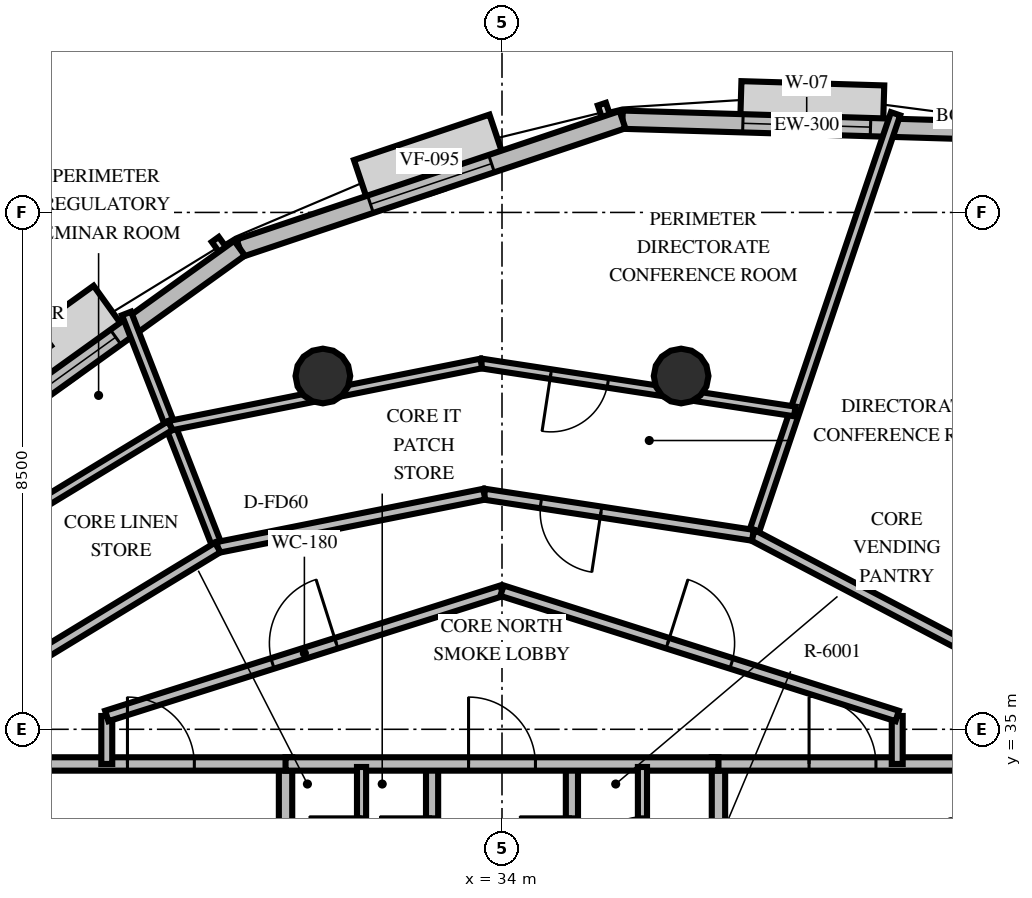
"""IFC4 building model, lengths in metres.
Left out: names, types, materials, properties, quantities, classifications, styles, units other than length and angle.
Written with IfcOpenShell. Run it as: python <this file> out.ifc"""

import sys

from ifc_helpers import new_model, si_unit, direction, frame, frame_2d, origin, origin_2d, place, context, subcontext, project, spatial, rectangle, circle, extrude, element, fill, save


model = new_model("IFC4")
c1 = context("Model", 3, precision=1e-05, world=origin(), true_north=direction((0.0, 1.0)))
c2 = subcontext(c1, "Body", "Model", "MODEL_VIEW")
j1 = project(units=[si_unit("LENGTHUNIT", "METRE"), si_unit("PLANEANGLEUNIT", "RADIAN")], contexts=[c1])
p1 = place(None, origin())
s1 = spatial("IfcSite", under=j1, at=p1, CompositionType="ELEMENT")
p2 = place(p1, origin())
s2 = spatial("IfcBuilding", under=s1, at=p2, CompositionType="ELEMENT")
p3 = place(p2, frame((0.0, 0.0, 244.8)))
s3 = spatial("IfcBuildingStorey", under=s2, at=p3, CompositionType="ELEMENT", Elevation=244.8)
for number, where, z_axis, x_axis in (
    (1, (36.946, 40.81, 0.0), (0.0, 0.0, 1.0), (1.0, 0.0, 0.0)),
    (2, (31.054, 40.81, 0.0), (0.0, 0.0, 1.0), (1.0, 0.0, 0.0)),
):
    element("IfcColumn", number, at=place(p3, frame(where, z_axis=z_axis, x_axis=x_axis)), inside=s3, PredefinedType="COLUMN", context=c2, shape_type="SweptSolid", body=[
        extrude(circle(Radius=0.45, at=origin_2d()), origin(), (0.0, 0.0, 1.0), 3.6),
    ])
p4 = place(p3, frame((42.041, 44.844, 0.0), z_axis=(0.0, 0.0, 1.0), x_axis=(-0.999549748053, 0.030005019031, 0.0)))
e3 = element("IfcWall", 3, at=p4, inside=s3, PredefinedType="SOLIDWALL", context=c2, shape_type="SweptSolid", body=[
    extrude(rectangle(XDim=6.062, YDim=0.3, at=frame_2d((3.031, 0.0))), origin(), (0.0, 0.0, 1.0), 2.76),
])
p5 = place(p4, frame((1.981, 0.0, 0.8)))
e4 = element("IfcOpeningElement", 4, at=p5, cuts=e3, PredefinedType="OPENING", context=c2, shape_type="SweptSolid", body=[
    extrude(rectangle(XDim=2.1, YDim=1.85, at=frame_2d((1.05, 0.925))), frame((0.0, 0.16, 0.0), z_axis=(0.0, -1.0, 0.0), x_axis=(1.0, 0.0, 0.0)), (0.0, 0.0, 1.0), 0.32),
])
p6 = place(p3, frame((35.982, 45.025, 0.0), z_axis=(0.0, 0.0, 1.0), x_axis=(-0.948064074007, -0.318079410805, 0.0)))
e5 = element("IfcWall", 5, at=p6, inside=s3, PredefinedType="SOLIDWALL", context=c2, shape_type="SweptSolid", body=[
    extrude(rectangle(XDim=6.643, YDim=0.3, at=frame_2d((3.322, 0.0))), origin(), (0.0, 0.0, 1.0), 2.76),
])
p7 = place(p6, frame((2.272, 0.0, 0.8)))
e6 = element("IfcOpeningElement", 6, at=p7, cuts=e5, PredefinedType="OPENING", context=c2, shape_type="SweptSolid", body=[
    extrude(rectangle(XDim=2.1, YDim=1.85, at=frame_2d((1.05, 0.925))), frame((0.0, 0.16, 0.0), z_axis=(0.0, -1.0, 0.0), x_axis=(1.0, 0.0, 0.0)), (0.0, 0.0, 1.0), 0.32),
])
p8 = place(p3, frame((29.684, 42.912, 0.0), z_axis=(0.0, 0.0, 1.0), x_axis=(-0.81200266695, -0.583653723424, 0.0)))
e7 = element("IfcWall", 7, at=p8, inside=s3, PredefinedType="SOLIDWALL", context=c2, shape_type="SweptSolid", body=[
    extrude(rectangle(XDim=7.115, YDim=0.3, at=frame_2d((3.558, 0.0))), origin(), (0.0, 0.0, 1.0), 2.76),
])
p9 = place(p8, frame((2.508, 0.0, 0.8)))
e8 = element("IfcOpeningElement", 8, at=p9, cuts=e7, PredefinedType="OPENING", context=c2, shape_type="SweptSolid", body=[
    extrude(rectangle(XDim=2.1, YDim=1.85, at=frame_2d((1.05, 0.925))), frame((0.0, 0.16, 0.0), z_axis=(0.0, -1.0, 0.0), x_axis=(1.0, 0.0, 0.0)), (0.0, 0.0, 1.0), 0.32),
])
p10 = place(p3, frame((30.44, 30.05, 0.0), z_axis=(0.0, 0.0, 1.0), x_axis=(0.0, 1.0, 0.0)))
e9 = element("IfcWall", 9, at=p10, inside=s3, PredefinedType="SOLIDWALL", context=c2, shape_type="SweptSolid", body=[
    extrude(rectangle(XDim=4.38, YDim=0.22, at=frame_2d((2.19, 0.0))), origin(), (0.0, 0.0, 1.0), 2.46),
])
p11 = place(p10, frame((0.8, 0.0, 0.0)))
e10 = element("IfcOpeningElement", 10, at=p11, cuts=e9, PredefinedType="OPENING", context=c2, shape_type="SweptSolid", body=[
    extrude(rectangle(XDim=1.05, YDim=2.1, at=frame_2d((0.525, 1.05))), frame((0.0, 0.12, 0.0), z_axis=(0.0, -1.0, 0.0), x_axis=(1.0, 0.0, 0.0)), (0.0, 0.0, 1.0), 0.24),
])
p12 = place(p3, frame((26.24, 34.43, 0.0), z_axis=(0.0, 0.0, 1.0), x_axis=(1.0, 0.0, 0.0)))
e11 = element("IfcWall", 11, at=p12, inside=s3, PredefinedType="SOLIDWALL", context=c2, shape_type="SweptSolid", body=[
    extrude(rectangle(XDim=4.31, YDim=0.22, at=frame_2d((2.155, 0.0))), origin(), (0.0, 0.0, 1.0), 2.46),
])
p13 = place(p12, frame((1.6, 0.0, 0.0)))
e12 = element("IfcOpeningElement", 12, at=p13, cuts=e11, PredefinedType="OPENING", context=c2, shape_type="SweptSolid", body=[
    extrude(rectangle(XDim=1.1, YDim=2.15, at=frame_2d((0.55, 1.075))), frame((0.0, 0.12, 0.0), z_axis=(0.0, -1.0, 0.0), x_axis=(1.0, 0.0, 0.0)), (0.0, 0.0, 1.0), 0.24),
])
p14 = place(p3, frame((32.85, 30.05, 0.0), z_axis=(0.0, 0.0, 1.0), x_axis=(0.0, 1.0, 0.0)))
e13 = element("IfcWall", 13, at=p14, inside=s3, PredefinedType="SOLIDWALL", context=c2, shape_type="SweptSolid", body=[
    extrude(rectangle(XDim=4.38, YDim=0.2, at=frame_2d((2.19, 0.0))), origin(), (0.0, 0.0, 1.0), 2.46),
])
p15 = place(p14, frame((2.65, 0.0, 0.0)))
e14 = element("IfcOpeningElement", 14, at=p15, cuts=e13, PredefinedType="OPENING", context=c2, shape_type="SweptSolid", body=[
    extrude(rectangle(XDim=0.86, YDim=2.05, at=frame_2d((0.43, 1.025))), frame((0.0, 0.11, 0.0), z_axis=(0.0, -1.0, 0.0), x_axis=(1.0, 0.0, 0.0)), (0.0, 0.0, 1.0), 0.22),
])
p16 = place(p3, frame((37.56, 30.05, 0.0), z_axis=(0.0, 0.0, 1.0), x_axis=(0.0, 1.0, 0.0)))
e15 = element("IfcWall", 15, at=p16, inside=s3, PredefinedType="SOLIDWALL", context=c2, shape_type="SweptSolid", body=[
    extrude(rectangle(XDim=4.38, YDim=0.22, at=frame_2d((2.19, 0.0))), origin(), (0.0, 0.0, 1.0), 2.46),
])
p17 = place(p16, frame((0.8, 0.0, 0.0)))
e16 = element("IfcOpeningElement", 16, at=p17, cuts=e15, PredefinedType="OPENING", context=c2, shape_type="SweptSolid", body=[
    extrude(rectangle(XDim=1.05, YDim=2.1, at=frame_2d((0.525, 1.05))), frame((0.0, 0.12, 0.0), z_axis=(0.0, -1.0, 0.0), x_axis=(1.0, 0.0, 0.0)), (0.0, 0.0, 1.0), 0.24),
])
p18 = place(p3, frame((37.45, 34.43, 0.0), z_axis=(0.0, 0.0, 1.0), x_axis=(1.0, 0.0, 0.0)))
e17 = element("IfcWall", 17, at=p18, inside=s3, PredefinedType="SOLIDWALL", context=c2, shape_type="SweptSolid", body=[
    extrude(rectangle(XDim=4.31, YDim=0.22, at=frame_2d((2.155, 0.0))), origin(), (0.0, 0.0, 1.0), 2.46),
])
p19 = place(p18, frame((1.6, 0.0, 0.0)))
e18 = element("IfcOpeningElement", 18, at=p19, cuts=e17, PredefinedType="OPENING", context=c2, shape_type="SweptSolid", body=[
    extrude(rectangle(XDim=1.1, YDim=2.15, at=frame_2d((0.55, 1.075))), frame((0.0, 0.12, 0.0), z_axis=(0.0, -1.0, 0.0), x_axis=(1.0, 0.0, 0.0)), (0.0, 0.0, 1.0), 0.24),
])
p20 = place(p3, frame((35.15, 30.05, 0.0), z_axis=(0.0, 0.0, 1.0), x_axis=(0.0, 1.0, 0.0)))
e19 = element("IfcWall", 19, at=p20, inside=s3, PredefinedType="SOLIDWALL", context=c2, shape_type="SweptSolid", body=[
    extrude(rectangle(XDim=4.38, YDim=0.2, at=frame_2d((2.19, 0.0))), origin(), (0.0, 0.0, 1.0), 2.46),
])
p21 = place(p20, frame((2.65, 0.0, 0.0)))
e20 = element("IfcOpeningElement", 20, at=p21, cuts=e19, PredefinedType="OPENING", context=c2, shape_type="SweptSolid", body=[
    extrude(rectangle(XDim=0.86, YDim=2.05, at=frame_2d((0.43, 1.025))), frame((0.0, 0.11, 0.0), z_axis=(0.0, -1.0, 0.0), x_axis=(1.0, 0.0, 0.0)), (0.0, 0.0, 1.0), 0.22),
])
p22 = place(p3, frame((30.44, 34.43, 0.0), z_axis=(0.0, 0.0, 1.0), x_axis=(1.0, 0.0, 0.0)))
e21 = element("IfcWall", 21, at=p22, inside=s3, PredefinedType="SOLIDWALL", context=c2, shape_type="SweptSolid", body=[
    extrude(rectangle(XDim=7.12, YDim=0.22, at=frame_2d((3.56, 0.0))), origin(), (0.0, 0.0, 1.0), 2.46),
])
p23 = place(p22, frame((3.01, 0.0, 0.0)))
e22 = element("IfcOpeningElement", 22, at=p23, cuts=e21, PredefinedType="OPENING", context=c2, shape_type="SweptSolid", body=[
    extrude(rectangle(XDim=1.1, YDim=2.15, at=frame_2d((0.55, 1.075))), frame((0.0, 0.12, 0.0), z_axis=(0.0, -1.0, 0.0), x_axis=(1.0, 0.0, 0.0)), (0.0, 0.0, 1.0), 0.24),
])
p24 = place(p3, frame((31.69, 32.05, 0.0), z_axis=(0.0, 0.0, 1.0), x_axis=(0.0, 1.0, 0.0)))
e23 = element("IfcWall", 23, at=p24, inside=s3, PredefinedType="PARTITIONING", context=c2, shape_type="SweptSolid", body=[
    extrude(rectangle(XDim=2.33, YDim=0.15, at=frame_2d((1.165, 0.0))), origin(), (0.0, 0.0, 1.0), 2.46),
])
p25 = place(p24, frame((0.65, 0.0, 0.0)))
e24 = element("IfcOpeningElement", 24, at=p25, cuts=e23, PredefinedType="OPENING", context=c2, shape_type="SweptSolid", body=[
    extrude(rectangle(XDim=0.86, YDim=2.05, at=frame_2d((0.43, 1.025))), frame((0.0, 0.085, 0.0), z_axis=(0.0, -1.0, 0.0), x_axis=(1.0, 0.0, 0.0)), (0.0, 0.0, 1.0), 0.17),
])
p26 = place(p3, frame((36.31, 32.05, 0.0), z_axis=(0.0, 0.0, 1.0), x_axis=(0.0, 1.0, 0.0)))
e25 = element("IfcWall", 25, at=p26, inside=s3, PredefinedType="PARTITIONING", context=c2, shape_type="SweptSolid", body=[
    extrude(rectangle(XDim=2.33, YDim=0.15, at=frame_2d((1.165, 0.0))), origin(), (0.0, 0.0, 1.0), 2.46),
])
p27 = place(p26, frame((0.65, 0.0, 0.0)))
e26 = element("IfcOpeningElement", 26, at=p27, cuts=e25, PredefinedType="OPENING", context=c2, shape_type="SweptSolid", body=[
    extrude(rectangle(XDim=0.86, YDim=2.05, at=frame_2d((0.43, 1.025))), frame((0.0, 0.085, 0.0), z_axis=(0.0, -1.0, 0.0), x_axis=(1.0, 0.0, 0.0)), (0.0, 0.0, 1.0), 0.17),
])
for number, where, z_axis, x_axis in (
    (27, (27.5, 34.43, 0.0), (0.0, 0.0, 1.0), (0.0, 1.0, 0.0)),
    (28, (40.5, 35.219, 0.0), (0.0, 0.0, 1.0), (0.0, -1.0, 0.0)),
):
    element("IfcWall", number, at=place(p3, frame(where, z_axis=z_axis, x_axis=x_axis)), inside=s3, PredefinedType="PARTITIONING", context=c2, shape_type="SweptSolid", body=[
        extrude(rectangle(XDim=0.789, YDim=0.18, at=frame_2d((0.395, 0.0))), origin(), (0.0, 0.0, 1.0), 2.46),
    ])
p28 = place(p3, frame((27.5, 35.219, 0.0), z_axis=(0.0, 0.0, 1.0), x_axis=(0.953228121756, 0.302251795518, 0.0)))
e29 = element("IfcWall", 29, at=p28, inside=s3, PredefinedType="PARTITIONING", context=c2, shape_type="SweptSolid", body=[
    extrude(rectangle(XDim=6.819, YDim=0.18, at=frame_2d((3.409, 0.0))), origin(), (0.0, 0.0, 1.0), 2.46),
])
p29 = place(p28, frame((2.86, 0.0, 0.0)))
e30 = element("IfcOpeningElement", 30, at=p29, cuts=e29, PredefinedType="OPENING", context=c2, shape_type="SweptSolid", body=[
    extrude(rectangle(XDim=1.1, YDim=2.15, at=frame_2d((0.55, 1.075))), frame((0.0, 0.1, 0.0), z_axis=(0.0, -1.0, 0.0), x_axis=(1.0, 0.0, 0.0)), (0.0, 0.0, 1.0), 0.2),
])
p30 = place(p3, frame((34.0, 37.28, 0.0), z_axis=(0.0, 0.0, 1.0), x_axis=(0.953228121756, -0.302251795518, 0.0)))
e31 = element("IfcWall", 31, at=p30, inside=s3, PredefinedType="PARTITIONING", context=c2, shape_type="SweptSolid", body=[
    extrude(rectangle(XDim=6.819, YDim=0.18, at=frame_2d((3.409, 0.0))), origin(), (0.0, 0.0, 1.0), 2.46),
])
p31 = place(p30, frame((2.86, 0.0, 0.0)))
e32 = element("IfcOpeningElement", 32, at=p31, cuts=e31, PredefinedType="OPENING", context=c2, shape_type="SweptSolid", body=[
    extrude(rectangle(XDim=1.1, YDim=2.15, at=frame_2d((0.55, 1.075))), frame((0.0, 0.1, 0.0), z_axis=(0.0, -1.0, 0.0), x_axis=(1.0, 0.0, 0.0)), (0.0, 0.0, 1.0), 0.2),
])
p32 = place(p3, frame((38.126, 38.191, 0.0), z_axis=(0.0, 0.0, 1.0), x_axis=(0.320627947746, 0.947205214895, 0.0)))
e33 = element("IfcWall", 33, at=p32, inside=s3, PredefinedType="PARTITIONING", context=c2, shape_type="SweptSolid", body=[
    extrude(rectangle(XDim=7.318, YDim=0.16, at=frame_2d((3.659, 0.0))), origin(), (0.0, 0.0, 1.0), 2.46),
])
p33 = place(p3, frame((41.691, 36.319, 0.0), z_axis=(0.0, 0.0, 1.0), x_axis=(-0.885387297467, 0.464854099136, 0.0)))
e34 = element("IfcWall", 34, at=p33, inside=s3, PredefinedType="PARTITIONING", context=c2, shape_type="SweptSolid", body=[
    extrude(rectangle(XDim=4.027, YDim=0.18, at=frame_2d((2.013, 0.0))), origin(), (0.0, 0.0, 1.0), 2.46),
])
p34 = place(p3, frame((29.325, 37.991, 0.0), z_axis=(0.0, 0.0, 1.0), x_axis=(-0.36329344764, 0.931674766698, 0.0)))
e35 = element("IfcWall", 35, at=p34, inside=s3, PredefinedType="PARTITIONING", context=c2, shape_type="SweptSolid", body=[
    extrude(rectangle(XDim=4.13, YDim=0.16, at=frame_2d((2.065, 0.0))), origin(), (0.0, 0.0, 1.0), 2.46),
])
p35 = place(p3, frame((38.126, 38.191, 0.0), z_axis=(0.0, 0.0, 1.0), x_axis=(-0.988495766308, 0.151248537156, 0.0)))
e36 = element("IfcWall", 36, at=p35, inside=s3, PredefinedType="PARTITIONING", context=c2, shape_type="SweptSolid", body=[
    extrude(rectangle(XDim=4.47, YDim=0.18, at=frame_2d((2.235, 0.0))), origin(), (0.0, 0.0, 1.0), 2.46),
])
p36 = place(p35, frame((2.527, 0.0, 0.0)))
e37 = element("IfcOpeningElement", 37, at=p36, cuts=e36, PredefinedType="OPENING", context=c2, shape_type="SweptSolid", body=[
    extrude(rectangle(XDim=1.0, YDim=2.15, at=frame_2d((0.5, 1.075))), frame((0.0, 0.1, 0.0), z_axis=(0.0, -1.0, 0.0), x_axis=(1.0, 0.0, 0.0)), (0.0, 0.0, 1.0), 0.2),
])
p37 = place(p3, frame((33.708, 38.867, 0.0), z_axis=(0.0, 0.0, 1.0), x_axis=(-0.980618472296, -0.195927057323, 0.0)))
e38 = element("IfcWall", 38, at=p37, inside=s3, PredefinedType="PARTITIONING", context=c2, shape_type="SweptSolid", body=[
    extrude(rectangle(XDim=4.47, YDim=0.18, at=frame_2d((2.235, 0.0))), origin(), (0.0, 0.0, 1.0), 2.46),
])
p38 = place(p3, frame((38.816, 40.227, 0.0), z_axis=(0.0, 0.0, 1.0), x_axis=(-0.988493657032, 0.151262321837, 0.0)))
e39 = element("IfcWall", 39, at=p38, inside=s3, PredefinedType="PARTITIONING", context=c2, shape_type="SweptSolid", body=[
    extrude(rectangle(XDim=5.217, YDim=0.16, at=frame_2d((2.608, 0.0))), origin(), (0.0, 0.0, 1.0), 2.46),
])
p39 = place(p38, frame((3.11, 0.0, 0.0)))
e40 = element("IfcOpeningElement", 40, at=p39, cuts=e39, PredefinedType="OPENING", context=c2, shape_type="SweptSolid", body=[
    extrude(rectangle(XDim=0.95, YDim=2.15, at=frame_2d((0.475, 1.075))), frame((0.0, 0.09, 0.0), z_axis=(0.0, -1.0, 0.0), x_axis=(1.0, 0.0, 0.0)), (0.0, 0.0, 1.0), 0.18),
])
p40 = place(p3, frame((33.659, 41.016, 0.0), z_axis=(0.0, 0.0, 1.0), x_axis=(-0.980611265553, -0.195963123753, 0.0)))
e41 = element("IfcWall", 41, at=p40, inside=s3, PredefinedType="PARTITIONING", context=c2, shape_type="SweptSolid", body=[
    extrude(rectangle(XDim=5.216, YDim=0.16, at=frame_2d((2.608, 0.0))), origin(), (0.0, 0.0, 1.0), 2.46),
])
p41 = place(p3, frame((29.325, 37.991, 0.0), z_axis=(0.0, 0.0, 1.0), x_axis=(-0.854436839573, -0.519555278272, 0.0)))
e42 = element("IfcWall", 42, at=p41, inside=s3, PredefinedType="PARTITIONING", context=c2, shape_type="SweptSolid", body=[
    extrude(rectangle(XDim=4.47, YDim=0.18, at=frame_2d((2.235, 0.0))), origin(), (0.0, 0.0, 1.0), 2.46),
])
p42 = place(p3, frame((28.544, 39.994, 0.0), z_axis=(0.0, 0.0, 1.0), x_axis=(-0.854455131512, -0.519525194993, 0.0)))
e43 = element("IfcWall", 43, at=p42, inside=s3, PredefinedType="PARTITIONING", context=c2, shape_type="SweptSolid", body=[
    extrude(rectangle(XDim=5.216, YDim=0.16, at=frame_2d((2.608, 0.0))), origin(), (0.0, 0.0, 1.0), 2.46),
])
p43 = place(p5, origin())
e44 = element("IfcWindow", 44, at=p43, inside=s3, PartitioningType="SINGLE_PANEL", PredefinedType="WINDOW", context=c2, shape_type="SweptSolid", body=[
    extrude(rectangle(XDim=2.1, YDim=1.85, at=frame_2d((1.05, 0.925))), frame((0.0, 0.03, 0.0), z_axis=(0.0, -1.0, 0.0), x_axis=(1.0, 0.0, 0.0)), (0.0, 0.0, 1.0), 0.06),
])
fill(e4, e44)
p44 = place(p7, origin())
e45 = element("IfcWindow", 45, at=p44, inside=s3, PartitioningType="SINGLE_PANEL", PredefinedType="WINDOW", context=c2, shape_type="SweptSolid", body=[
    extrude(rectangle(XDim=2.1, YDim=1.85, at=frame_2d((1.05, 0.925))), frame((0.0, 0.03, 0.0), z_axis=(0.0, -1.0, 0.0), x_axis=(1.0, 0.0, 0.0)), (0.0, 0.0, 1.0), 0.06),
])
fill(e6, e45)
p45 = place(p9, origin())
e46 = element("IfcWindow", 46, at=p45, inside=s3, PartitioningType="SINGLE_PANEL", PredefinedType="WINDOW", context=c2, shape_type="SweptSolid", body=[
    extrude(rectangle(XDim=2.1, YDim=1.85, at=frame_2d((1.05, 0.925))), frame((0.0, 0.03, 0.0), z_axis=(0.0, -1.0, 0.0), x_axis=(1.0, 0.0, 0.0)), (0.0, 0.0, 1.0), 0.06),
])
fill(e8, e46)
p46 = place(p13, origin())
e47 = element("IfcDoor", 47, at=p46, inside=s3, OperationType="SINGLE_SWING_LEFT", PredefinedType="DOOR", context=c2, shape_type="SweptSolid", body=[
    extrude(rectangle(XDim=1.1, YDim=2.15, at=frame_2d((0.55, 1.075))), frame((0.0, 0.025, 0.0), z_axis=(0.0, -1.0, 0.0), x_axis=(1.0, 0.0, 0.0)), (0.0, 0.0, 1.0), 0.05),
])
fill(e12, e47)
p47 = place(p15, origin())
e48 = element("IfcDoor", 48, at=p47, inside=s3, OperationType="SINGLE_SWING_RIGHT", PredefinedType="TRAPDOOR", context=c2, shape_type="SweptSolid", body=[
    extrude(rectangle(XDim=0.86, YDim=2.05, at=frame_2d((0.43, 1.025))), frame((0.0, 0.025, 0.0), z_axis=(0.0, -1.0, 0.0), x_axis=(1.0, 0.0, 0.0)), (0.0, 0.0, 1.0), 0.05),
])
fill(e14, e48)
p48 = place(p19, origin())
e49 = element("IfcDoor", 49, at=p48, inside=s3, OperationType="SINGLE_SWING_LEFT", PredefinedType="DOOR", context=c2, shape_type="SweptSolid", body=[
    extrude(rectangle(XDim=1.1, YDim=2.15, at=frame_2d((0.55, 1.075))), frame((0.0, 0.025, 0.0), z_axis=(0.0, -1.0, 0.0), x_axis=(1.0, 0.0, 0.0)), (0.0, 0.0, 1.0), 0.05),
])
fill(e18, e49)
p49 = place(p21, origin())
e50 = element("IfcDoor", 50, at=p49, inside=s3, OperationType="SINGLE_SWING_RIGHT", PredefinedType="TRAPDOOR", context=c2, shape_type="SweptSolid", body=[
    extrude(rectangle(XDim=0.86, YDim=2.05, at=frame_2d((0.43, 1.025))), frame((0.0, 0.025, 0.0), z_axis=(0.0, -1.0, 0.0), x_axis=(1.0, 0.0, 0.0)), (0.0, 0.0, 1.0), 0.05),
])
fill(e20, e50)
p50 = place(p23, origin())
e51 = element("IfcDoor", 51, at=p50, inside=s3, OperationType="SINGLE_SWING_LEFT", PredefinedType="DOOR", context=c2, shape_type="SweptSolid", body=[
    extrude(rectangle(XDim=1.1, YDim=2.15, at=frame_2d((0.55, 1.075))), frame((0.0, 0.025, 0.0), z_axis=(0.0, -1.0, 0.0), x_axis=(1.0, 0.0, 0.0)), (0.0, 0.0, 1.0), 0.05),
])
fill(e22, e51)
p51 = place(p25, origin())
e52 = element("IfcDoor", 52, at=p51, inside=s3, OperationType="SINGLE_SWING_RIGHT", PredefinedType="TRAPDOOR", context=c2, shape_type="SweptSolid", body=[
    extrude(rectangle(XDim=0.86, YDim=2.05, at=frame_2d((0.43, 1.025))), frame((0.0, 0.025, 0.0), z_axis=(0.0, -1.0, 0.0), x_axis=(1.0, 0.0, 0.0)), (0.0, 0.0, 1.0), 0.05),
])
fill(e24, e52)
p52 = place(p27, origin())
e53 = element("IfcDoor", 53, at=p52, inside=s3, OperationType="SINGLE_SWING_LEFT", PredefinedType="TRAPDOOR", context=c2, shape_type="SweptSolid", body=[
    extrude(rectangle(XDim=0.86, YDim=2.05, at=frame_2d((0.43, 1.025))), frame((0.0, 0.025, 0.0), z_axis=(0.0, -1.0, 0.0), x_axis=(1.0, 0.0, 0.0)), (0.0, 0.0, 1.0), 0.05),
])
fill(e26, e53)
p53 = place(p29, origin())
e54 = element("IfcDoor", 54, at=p53, inside=s3, OperationType="SINGLE_SWING_RIGHT", PredefinedType="DOOR", context=c2, shape_type="SweptSolid", body=[
    extrude(rectangle(XDim=1.1, YDim=2.15, at=frame_2d((0.55, 1.075))), frame((0.0, 0.025, 0.0), z_axis=(0.0, -1.0, 0.0), x_axis=(1.0, 0.0, 0.0)), (0.0, 0.0, 1.0), 0.05),
])
fill(e30, e54)
p54 = place(p31, origin())
e55 = element("IfcDoor", 55, at=p54, inside=s3, OperationType="SINGLE_SWING_LEFT", PredefinedType="DOOR", context=c2, shape_type="SweptSolid", body=[
    extrude(rectangle(XDim=1.1, YDim=2.15, at=frame_2d((0.55, 1.075))), frame((0.0, 0.025, 0.0), z_axis=(0.0, -1.0, 0.0), x_axis=(1.0, 0.0, 0.0)), (0.0, 0.0, 1.0), 0.05),
])
fill(e32, e55)
p55 = place(p36, origin())
e56 = element("IfcDoor", 56, at=p55, inside=s3, OperationType="SINGLE_SWING_LEFT", PredefinedType="DOOR", context=c2, shape_type="SweptSolid", body=[
    extrude(rectangle(XDim=1.0, YDim=2.15, at=frame_2d((0.5, 1.075))), frame((0.0, 0.025, 0.0), z_axis=(0.0, -1.0, 0.0), x_axis=(1.0, 0.0, 0.0)), (0.0, 0.0, 1.0), 0.05),
])
fill(e37, e56)
p56 = place(p39, origin())
e57 = element("IfcDoor", 57, at=p56, inside=s3, OperationType="SINGLE_SWING_RIGHT", PredefinedType="DOOR", context=c2, shape_type="SweptSolid", body=[
    extrude(rectangle(XDim=0.95, YDim=2.15, at=frame_2d((0.475, 1.075))), frame((0.0, 0.025, 0.0), z_axis=(0.0, -1.0, 0.0), x_axis=(1.0, 0.0, 0.0)), (0.0, 0.0, 1.0), 0.05),
])
fill(e40, e57)
save(model, sys.argv[1])
